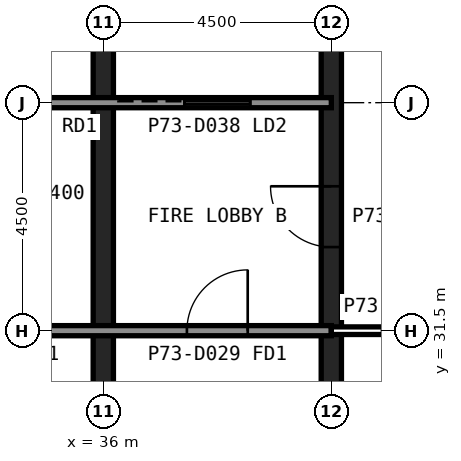
"""IFC4 building model, lengths in metres.
Left out: names, types, materials, properties, quantities, classifications, styles, units other than length and angle.
Written with IfcOpenShell. Run it as: python <this file> out.ifc"""

import sys

from ifc_helpers import new_model, si_unit, direction, frame, frame_2d, origin, place, context, subcontext, project, spatial, rectangle, extrude, element, fill, save


model = new_model("IFC4")
c1 = context("Model", 3, precision=1e-05, world=origin(), true_north=direction((0.0, 1.0)))
c2 = subcontext(c1, "Body", "Model", "MODEL_VIEW")
j1 = project(units=[si_unit("LENGTHUNIT", "METRE"), si_unit("PLANEANGLEUNIT", "RADIAN")], contexts=[c1])
p1 = place(None, origin())
s1 = spatial("IfcSite", under=j1, at=p1, CompositionType="ELEMENT")
p2 = place(p1, origin())
s2 = spatial("IfcBuilding", under=s1, at=p2, CompositionType="ELEMENT")
p3 = place(p2, frame((0.0, 0.0, 302.6)))
s3 = spatial("IfcBuildingStorey", under=s2, at=p3, CompositionType="ELEMENT", Elevation=302.6)
p4 = place(p3, frame((40.5, 13.5, 0.0), z_axis=(0.0, 0.0, 1.0), x_axis=(0.0, 1.0, 0.0)))
e1 = element("IfcWall", 1, at=p4, inside=s3, PredefinedType="SHEAR", context=c2, shape_type="SweptSolid", body=[
    extrude(rectangle(XDim=27.0, YDim=0.4, at=frame_2d((13.5, 0.0))), origin(), (0.0, 0.0, 1.0), 4.0),
])
p5 = place(p4, frame((5.85, 0.0, 0.0)))
e2 = element("IfcOpeningElement", 2, at=p5, cuts=e1, PredefinedType="OPENING", context=c2, shape_type="SweptSolid", body=[
    extrude(rectangle(XDim=1.8, YDim=2.1, at=frame_2d((0.9, 1.05))), frame((0.0, 0.21, 0.0), z_axis=(0.0, -1.0, 0.0), x_axis=(1.0, 0.0, 0.0)), (0.0, 0.0, 1.0), 0.42),
])
p6 = place(p4, frame((19.65, 0.0, 0.0)))
e3 = element("IfcOpeningElement", 3, at=p6, cuts=e1, PredefinedType="OPENING", context=c2, shape_type="SweptSolid", body=[
    extrude(rectangle(XDim=1.2, YDim=2.1, at=frame_2d((0.6, 1.05))), frame((0.0, 0.21, 0.0), z_axis=(0.0, -1.0, 0.0), x_axis=(1.0, 0.0, 0.0)), (0.0, 0.0, 1.0), 0.42),
])
p7 = place(p3, frame((36.0, 22.5, 0.0), z_axis=(0.0, 0.0, 1.0), x_axis=(0.0, 1.0, 0.0)))
e4 = element("IfcWall", 4, at=p7, inside=s3, PredefinedType="SHEAR", context=c2, shape_type="SweptSolid", body=[
    extrude(rectangle(XDim=18.0, YDim=0.4, at=frame_2d((9.0, 0.0))), origin(), (0.0, 0.0, 1.0), 4.0),
])
p8 = place(p3, frame((13.5, 36.0, 0.0), z_axis=(0.0, 0.0, 1.0), x_axis=(1.0, 0.0, 0.0)))
e5 = element("IfcWall", 5, at=p8, inside=s3, PredefinedType="SOLIDWALL", context=c2, shape_type="SweptSolid", body=[
    extrude(rectangle(XDim=27.0, YDim=0.2, at=frame_2d((13.5, 0.0))), origin(), (0.0, 0.0, 1.0), 3.84),
])
p9 = place(p8, frame((1.8, 0.0, 0.0)))
e6 = element("IfcOpeningElement", 6, at=p9, cuts=e5, PredefinedType="OPENING", context=c2, shape_type="SweptSolid", body=[
    extrude(rectangle(XDim=0.9, YDim=2.1, at=frame_2d((0.45, 1.05))), frame((0.0, 0.11, 0.0), z_axis=(0.0, -1.0, 0.0), x_axis=(1.0, 0.0, 0.0)), (0.0, 0.0, 1.0), 0.22),
])
p10 = place(p8, frame((5.55, 0.0, 0.0)))
e7 = element("IfcOpeningElement", 7, at=p10, cuts=e5, PredefinedType="OPENING", context=c2, shape_type="SweptSolid", body=[
    extrude(rectangle(XDim=0.9, YDim=2.1, at=frame_2d((0.45, 1.05))), frame((0.0, 0.11, 0.0), z_axis=(0.0, -1.0, 0.0), x_axis=(1.0, 0.0, 0.0)), (0.0, 0.0, 1.0), 0.22),
])
p11 = place(p8, frame((14.55, 0.0, 0.0)))
e8 = element("IfcOpeningElement", 8, at=p11, cuts=e5, PredefinedType="OPENING", context=c2, shape_type="SweptSolid", body=[
    extrude(rectangle(XDim=0.9, YDim=2.1, at=frame_2d((0.45, 1.05))), frame((0.0, 0.11, 0.0), z_axis=(0.0, -1.0, 0.0), x_axis=(1.0, 0.0, 0.0)), (0.0, 0.0, 1.0), 0.22),
])
p12 = place(p8, frame((17.55, 0.0, 0.0)))
e9 = element("IfcOpeningElement", 9, at=p12, cuts=e5, PredefinedType="OPENING", context=c2, shape_type="SweptSolid", body=[
    extrude(rectangle(XDim=0.9, YDim=2.1, at=frame_2d((0.45, 1.05))), frame((0.0, 0.11, 0.0), z_axis=(0.0, -1.0, 0.0), x_axis=(1.0, 0.0, 0.0)), (0.0, 0.0, 1.0), 0.22),
])
p13 = place(p8, frame((20.55, 0.0, 0.0)))
e10 = element("IfcOpeningElement", 10, at=p13, cuts=e5, PredefinedType="OPENING", context=c2, shape_type="SweptSolid", body=[
    extrude(rectangle(XDim=0.9, YDim=2.1, at=frame_2d((0.45, 1.05))), frame((0.0, 0.11, 0.0), z_axis=(0.0, -1.0, 0.0), x_axis=(1.0, 0.0, 0.0)), (0.0, 0.0, 1.0), 0.22),
])
p14 = place(p8, frame((24.1, 0.0, 0.0)))
e11 = element("IfcOpeningElement", 11, at=p14, cuts=e5, PredefinedType="OPENING", context=c2, shape_type="SweptSolid", body=[
    extrude(rectangle(XDim=1.3, YDim=2.2, at=frame_2d((0.65, 1.1))), frame((0.0, 0.11, 0.0), z_axis=(0.0, -1.0, 0.0), x_axis=(1.0, 0.0, 0.0)), (0.0, 0.0, 1.0), 0.22),
])
p15 = place(p3, frame((13.5, 31.5, 0.0), z_axis=(0.0, 0.0, 1.0), x_axis=(1.0, 0.0, 0.0)))
e12 = element("IfcWall", 12, at=p15, inside=s3, PredefinedType="SOLIDWALL", context=c2, shape_type="SweptSolid", body=[
    extrude(rectangle(XDim=27.0, YDim=0.2, at=frame_2d((13.5, 0.0))), origin(), (0.0, 0.0, 1.0), 3.84),
])
p16 = place(p15, frame((24.15, 0.0, 0.0)))
e13 = element("IfcOpeningElement", 13, at=p16, cuts=e12, PredefinedType="OPENING", context=c2, shape_type="SweptSolid", body=[
    extrude(rectangle(XDim=1.2, YDim=2.1, at=frame_2d((0.6, 1.05))), frame((0.0, 0.11, 0.0), z_axis=(0.0, -1.0, 0.0), x_axis=(1.0, 0.0, 0.0)), (0.0, 0.0, 1.0), 0.22),
])
p17 = place(p15, frame((15.3, 0.0, 0.0)))
e14 = element("IfcOpeningElement", 14, at=p17, cuts=e12, PredefinedType="OPENING", context=c2, shape_type="SweptSolid", body=[
    extrude(rectangle(XDim=0.9, YDim=2.1, at=frame_2d((0.45, 1.05))), frame((0.0, 0.11, 0.0), z_axis=(0.0, -1.0, 0.0), x_axis=(1.0, 0.0, 0.0)), (0.0, 0.0, 1.0), 0.22),
])
p18 = place(p15, frame((19.8, 0.0, 0.0)))
e15 = element("IfcOpeningElement", 15, at=p18, cuts=e12, PredefinedType="OPENING", context=c2, shape_type="SweptSolid", body=[
    extrude(rectangle(XDim=0.9, YDim=2.1, at=frame_2d((0.45, 1.05))), frame((0.0, 0.11, 0.0), z_axis=(0.0, -1.0, 0.0), x_axis=(1.0, 0.0, 0.0)), (0.0, 0.0, 1.0), 0.22),
])
p19 = place(p3, frame((43.5, 31.5, 0.0), z_axis=(0.0, 0.0, 1.0), x_axis=(-1.0, 0.0, 0.0)))
e16 = element("IfcWall", 16, at=p19, inside=s3, PredefinedType="PARTITIONING", context=c2, shape_type="SweptSolid", body=[
    extrude(rectangle(XDim=3.0, YDim=0.15, at=frame_2d((1.5, 0.0))), origin(), (0.0, 0.0, 1.0), 2.989),
])
p20 = place(p19, frame((1.0, 0.0, 0.0)))
e17 = element("IfcOpeningElement", 17, at=p20, cuts=e16, PredefinedType="OPENING", context=c2, shape_type="SweptSolid", body=[
    extrude(rectangle(XDim=1.0, YDim=2.1, at=frame_2d((0.5, 1.05))), frame((0.0, 0.085, 0.0), z_axis=(0.0, -1.0, 0.0), x_axis=(1.0, 0.0, 0.0)), (0.0, 0.0, 1.0), 0.17),
])
p21 = place(p6, origin())
e18 = element("IfcDoor", 18, at=p21, inside=s3, OperationType="SINGLE_SWING_RIGHT", PredefinedType="DOOR", context=c2, shape_type="SweptSolid", body=[
    extrude(rectangle(XDim=1.2, YDim=2.1, at=frame_2d((0.6, 1.05))), frame((0.0, 0.025, 0.0), z_axis=(0.0, -1.0, 0.0), x_axis=(1.0, 0.0, 0.0)), (0.0, 0.0, 1.0), 0.05),
])
fill(e3, e18)
p22 = place(p16, origin())
e19 = element("IfcDoor", 19, at=p22, inside=s3, OperationType="SINGLE_SWING_RIGHT", PredefinedType="DOOR", context=c2, shape_type="SweptSolid", body=[
    extrude(rectangle(XDim=1.2, YDim=2.1, at=frame_2d((0.6, 1.05))), frame((0.0, 0.025, 0.0), z_axis=(0.0, -1.0, 0.0), x_axis=(1.0, 0.0, 0.0)), (0.0, 0.0, 1.0), 0.05),
])
fill(e13, e19)
p23 = place(p14, origin())
e20 = element("IfcDoor", 20, at=p23, inside=s3, OperationType="SLIDING_TO_LEFT", PredefinedType="DOOR", context=c2, shape_type="SweptSolid", body=[
    extrude(rectangle(XDim=1.3, YDim=2.2, at=frame_2d((0.65, 1.1))), frame((0.0, 0.025, 0.0), z_axis=(0.0, -1.0, 0.0), x_axis=(1.0, 0.0, 0.0)), (0.0, 0.0, 1.0), 0.05),
])
fill(e11, e20)
save(model, sys.argv[1])
